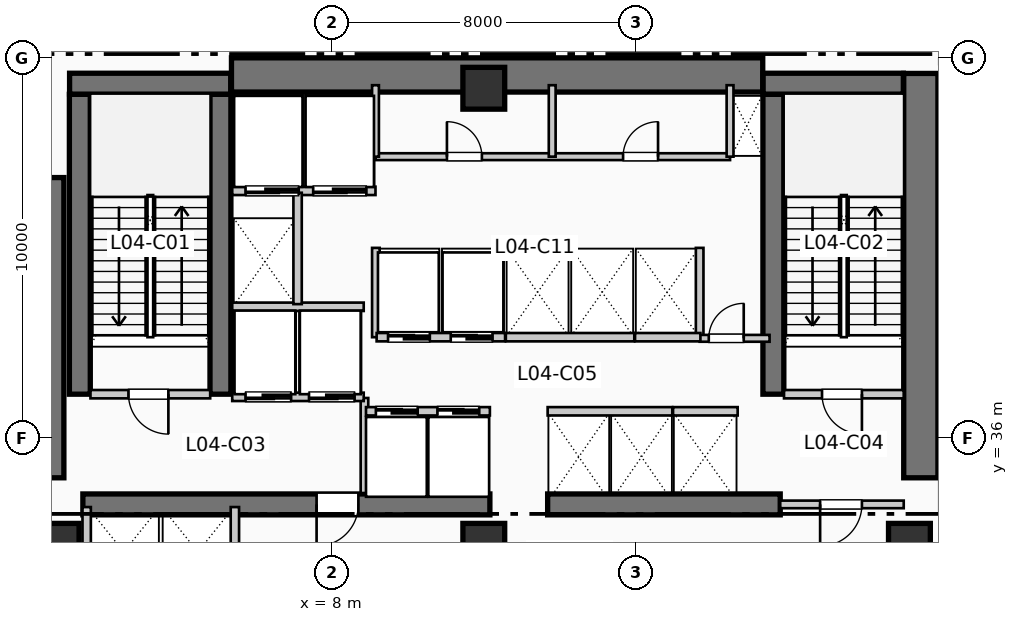
"""IFC4 building model, lengths in metres.
Left out: names, types, materials, properties, quantities, classifications, styles, units other than length and angle.
Written with IfcOpenShell. Run it as: python <this file> out.ifc"""

import sys

from ifc_helpers import new_model, si_unit, direction, frame, frame_2d, origin, origin_2d, place, context, subcontext, project, spatial, rectangle, extrude, element, fill, save


model = new_model("IFC4")
c1 = context("Model", 3, precision=1e-05, world=origin(), true_north=direction((0.0, 1.0)))
c2 = subcontext(c1, "Body", "Model", "MODEL_VIEW")
j1 = project(units=[si_unit("LENGTHUNIT", "METRE"), si_unit("PLANEANGLEUNIT", "RADIAN")], contexts=[c1])
p1 = place(None, origin())
s1 = spatial("IfcSite", under=j1, at=p1, CompositionType="ELEMENT")
p2 = place(p1, origin())
s2 = spatial("IfcBuilding", under=s1, at=p2, CompositionType="ELEMENT")
p3 = place(p2, frame((0.0, 0.0, 21.12)))
s3 = spatial("IfcBuildingStorey", under=s2, at=p3, CompositionType="ELEMENT", Elevation=21.12)
p4 = place(p3, frame((5.36, 45.55, 0.0), z_axis=(0.0, 0.0, 1.0), x_axis=(1.0, 0.0, 0.0)))
e1 = element("IfcWall", 1, at=p4, inside=s3, PredefinedType="SHEAR", context=c2, shape_type="SweptSolid", body=[
    extrude(rectangle(XDim=13.98, YDim=0.9, at=frame_2d((6.99, 0.0))), origin(), (0.0, 0.0, 1.0), 4.62),
])
p5 = place(p3, frame((0.5, 34.95, 0.0), z_axis=(0.0, 0.0, 1.0), x_axis=(0.0, 1.0, 0.0)))
e2 = element("IfcWall", 2, at=p5, inside=s3, PredefinedType="SHEAR", context=c2, shape_type="SweptSolid", body=[
    extrude(rectangle(XDim=7.9, YDim=0.9, at=frame_2d((3.95, 0.0))), origin(), (0.0, 0.0, 1.0), 4.62),
])
p6 = place(p3, frame((23.5, 34.95, 0.0), z_axis=(0.0, 0.0, 1.0), x_axis=(0.0, 1.0, 0.0)))
e3 = element("IfcWall", 3, at=p6, inside=s3, PredefinedType="SHEAR", context=c2, shape_type="SweptSolid", body=[
    extrude(rectangle(XDim=10.64, YDim=0.9, at=frame_2d((5.32, 0.0))), origin(), (0.0, 0.0, 1.0), 4.62),
])
p7 = place(p3, frame((1.45, 34.25, 0.0), z_axis=(0.0, 0.0, 1.0), x_axis=(1.0, 0.0, 0.0)))
e4 = element("IfcWall", 4, at=p7, inside=s3, PredefinedType="SHEAR", context=c2, shape_type="SweptSolid", body=[
    extrude(rectangle(XDim=10.71, YDim=0.55, at=frame_2d((5.355, 0.0))), origin(), (0.0, 0.0, 1.0), 4.62),
])
p8 = place(p7, frame((7.25, 0.0, 0.0), z_axis=(0.0, 0.0, 1.0), x_axis=(-1.0, 0.0, 0.0)))
e5 = element("IfcOpeningElement", 5, at=p8, cuts=e4, PredefinedType="OPENING", context=c2, shape_type="SweptSolid", body=[
    extrude(rectangle(XDim=1.1, YDim=2.15, at=frame_2d((0.55, 1.075))), frame((0.0, 0.285, 0.0), z_axis=(0.0, -1.0, 0.0), x_axis=(1.0, 0.0, 0.0)), (0.0, 0.0, 1.0), 0.57),
])
p9 = place(p3, frame((13.68, 34.25, 0.0), z_axis=(0.0, 0.0, 1.0), x_axis=(1.0, 0.0, 0.0)))
e6 = element("IfcWall", 6, at=p9, inside=s3, PredefinedType="SHEAR", context=c2, shape_type="SweptSolid", body=[
    extrude(rectangle(XDim=6.12, YDim=0.55, at=frame_2d((3.06, 0.0))), origin(), (0.0, 0.0, 1.0), 4.62),
])
for number, where, z_axis, x_axis in (
    (7, (1.37, 37.15, 0.0), (0.0, 0.0, 1.0), (0.0, 1.0, 0.0)),
    (8, (5.07, 37.15, 0.0), (0.0, 0.0, 1.0), (0.0, 1.0, 0.0)),
):
    element("IfcWall", number, at=place(p3, frame(where, z_axis=z_axis, x_axis=x_axis)), inside=s3, PredefinedType="SHEAR", context=c2, shape_type="SweptSolid", body=[
        extrude(rectangle(XDim=7.89, YDim=0.55, at=frame_2d((3.945, 0.0))), origin(), (0.0, 0.0, 1.0), 4.62),
    ])
p10 = place(p3, frame((1.1, 45.32, 0.0), z_axis=(0.0, 0.0, 1.0), x_axis=(1.0, 0.0, 0.0)))
e9 = element("IfcWall", 9, at=p10, inside=s3, PredefinedType="SHEAR", context=c2, shape_type="SweptSolid", body=[
    extrude(rectangle(XDim=4.24, YDim=0.55, at=frame_2d((2.12, 0.0))), origin(), (0.0, 0.0, 1.0), 4.62),
])
p11 = place(p3, frame((19.62, 37.15, 0.0), z_axis=(0.0, 0.0, 1.0), x_axis=(0.0, 1.0, 0.0)))
e10 = element("IfcWall", 10, at=p11, inside=s3, PredefinedType="SHEAR", context=c2, shape_type="SweptSolid", body=[
    extrude(rectangle(XDim=7.89, YDim=0.55, at=frame_2d((3.945, 0.0))), origin(), (0.0, 0.0, 1.0), 4.62),
])
p12 = place(p3, frame((19.35, 45.32, 0.0), z_axis=(0.0, 0.0, 1.0), x_axis=(1.0, 0.0, 0.0)))
e11 = element("IfcWall", 11, at=p12, inside=s3, PredefinedType="SHEAR", context=c2, shape_type="SweptSolid", body=[
    extrude(rectangle(XDim=3.69, YDim=0.55, at=frame_2d((1.845, 0.0))), origin(), (0.0, 0.0, 1.0), 4.62),
])
for number, where, z_axis, x_axis in (
    (12, (0.8, 33.2, 0.0), (0.0, 0.0, 1.0), (1.0, 0.0, 0.0)),
    (13, (12.0, 33.2, 0.0), (0.0, 0.0, 1.0), (1.0, 0.0, 0.0)),
    (14, (12.0, 45.2, 0.0), (0.0, 0.0, 1.0), (1.0, 0.0, 0.0)),
    (15, (23.2, 33.2, 0.0), (0.0, 0.0, 1.0), (1.0, 0.0, 0.0)),
):
    element("IfcColumn", number, at=place(p3, frame(where, z_axis=z_axis, x_axis=x_axis)), inside=s3, PredefinedType="COLUMN", context=c2, shape_type="SweptSolid", body=[
        extrude(rectangle(XDim=1.1, YDim=1.1, at=origin_2d()), origin(), (0.0, 0.0, 1.0), 4.62),
    ])
p13 = place(p3, frame((1.088, 47.834, 0.0), z_axis=(0.0, 0.0, 1.0), x_axis=(-0.707106781187, -0.707106781187, 0.0)))
e16 = element("IfcWall", 16, at=p13, inside=s3, PredefinedType="SOLIDWALL", context=c2, shape_type="SweptSolid", body=[
    extrude(rectangle(XDim=4.133, YDim=0.36, at=frame_2d((2.066, 0.0))), origin(), (0.0, 0.0, 1.0), 4.2),
])
p14 = place(p3, frame((1.65, 37.15, 0.0), z_axis=(0.0, 0.0, 1.0), x_axis=(1.0, 0.0, 0.0)))
e17 = element("IfcWall", 17, at=p14, inside=s3, PredefinedType="PARTITIONING", context=c2, shape_type="SweptSolid", body=[
    extrude(rectangle(XDim=3.15, YDim=0.22, at=frame_2d((1.575, 0.0))), origin(), (0.0, 0.0, 1.0), 4.2),
])
p15 = place(p14, frame((2.05, 0.0, 0.0), z_axis=(0.0, 0.0, 1.0), x_axis=(-1.0, 0.0, 0.0)))
e18 = element("IfcOpeningElement", 18, at=p15, cuts=e17, PredefinedType="OPENING", context=c2, shape_type="SweptSolid", body=[
    extrude(rectangle(XDim=1.05, YDim=2.15, at=frame_2d((0.525, 1.075))), frame((0.0, 0.12, 0.0), z_axis=(0.0, -1.0, 0.0), x_axis=(1.0, 0.0, 0.0)), (0.0, 0.0, 1.0), 0.24),
])
p16 = place(p3, frame((8.86, 34.55, 0.0), z_axis=(0.0, 0.0, 1.0), x_axis=(0.0, 1.0, 0.0)))
e19 = element("IfcWall", 19, at=p16, inside=s3, PredefinedType="PARTITIONING", context=c2, shape_type="SweptSolid", body=[
    extrude(rectangle(XDim=2.5, YDim=0.2, at=frame_2d((1.25, 0.0))), origin(), (0.0, 0.0, 1.0), 4.2),
])
p17 = place(p3, frame((19.9, 37.15, 0.0), z_axis=(0.0, 0.0, 1.0), x_axis=(1.0, 0.0, 0.0)))
e20 = element("IfcWall", 20, at=p17, inside=s3, PredefinedType="PARTITIONING", context=c2, shape_type="SweptSolid", body=[
    extrude(rectangle(XDim=3.15, YDim=0.22, at=frame_2d((1.575, 0.0))), origin(), (0.0, 0.0, 1.0), 4.2),
])
p18 = place(p17, frame((2.05, 0.0, 0.0), z_axis=(0.0, 0.0, 1.0), x_axis=(-1.0, 0.0, 0.0)))
e21 = element("IfcOpeningElement", 21, at=p18, cuts=e20, PredefinedType="OPENING", context=c2, shape_type="SweptSolid", body=[
    extrude(rectangle(XDim=1.05, YDim=2.15, at=frame_2d((0.525, 1.075))), frame((0.0, 0.12, 0.0), z_axis=(0.0, -1.0, 0.0), x_axis=(1.0, 0.0, 0.0)), (0.0, 0.0, 1.0), 0.24),
])
p19 = place(p3, frame((19.8, 34.25, 0.0), z_axis=(0.0, 0.0, 1.0), x_axis=(1.0, 0.0, 0.0)))
e22 = element("IfcWall", 22, at=p19, inside=s3, PredefinedType="PARTITIONING", context=c2, shape_type="SweptSolid", body=[
    extrude(rectangle(XDim=3.25, YDim=0.2, at=frame_2d((1.625, 0.0))), origin(), (0.0, 0.0, 1.0), 4.2),
])
p20 = place(p19, frame((2.15, 0.0, 0.0), z_axis=(0.0, 0.0, 1.0), x_axis=(-1.0, 0.0, 0.0)))
e23 = element("IfcOpeningElement", 23, at=p20, cuts=e22, PredefinedType="OPENING", context=c2, shape_type="SweptSolid", body=[
    extrude(rectangle(XDim=1.1, YDim=2.15, at=frame_2d((0.55, 1.075))), frame((0.0, 0.11, 0.0), z_axis=(0.0, -1.0, 0.0), x_axis=(1.0, 0.0, 0.0)), (0.0, 0.0, 1.0), 0.22),
])
p21 = place(p3, frame((5.38, 37.08, 0.0), z_axis=(0.0, 0.0, 1.0), x_axis=(1.0, 0.0, 0.0)))
e24 = element("IfcWall", 24, at=p21, inside=s3, PredefinedType="PARTITIONING", context=c2, shape_type="SweptSolid", body=[
    extrude(rectangle(XDim=3.46, YDim=0.22, at=frame_2d((1.73, 0.0))), origin(), (0.0, 0.0, 1.0), 4.2),
])
p22 = place(p21, frame((1.55, 0.0, 0.0), z_axis=(0.0, 0.0, 1.0), x_axis=(-1.0, 0.0, 0.0)))
e25 = element("IfcOpeningElement", 25, at=p22, cuts=e24, PredefinedType="OPENING", context=c2, shape_type="SweptSolid", body=[
    extrude(rectangle(XDim=1.2, YDim=2.2, at=frame_2d((0.6, 1.1))), frame((0.0, 0.12, 0.0), z_axis=(0.0, -1.0, 0.0), x_axis=(1.0, 0.0, 0.0)), (0.0, 0.0, 1.0), 0.24),
])
p23 = place(p21, frame((3.22, 0.0, 0.0), z_axis=(0.0, 0.0, 1.0), x_axis=(-1.0, 0.0, 0.0)))
e26 = element("IfcOpeningElement", 26, at=p23, cuts=e24, PredefinedType="OPENING", context=c2, shape_type="SweptSolid", body=[
    extrude(rectangle(XDim=1.2, YDim=2.2, at=frame_2d((0.6, 1.1))), frame((0.0, 0.12, 0.0), z_axis=(0.0, -1.0, 0.0), x_axis=(1.0, 0.0, 0.0)), (0.0, 0.0, 1.0), 0.24),
])
p24 = place(p3, frame((5.38, 39.45, 0.0), z_axis=(0.0, 0.0, 1.0), x_axis=(1.0, 0.0, 0.0)))
e27 = element("IfcWall", 27, at=p24, inside=s3, PredefinedType="PARTITIONING", context=c2, shape_type="SweptSolid", body=[
    extrude(rectangle(XDim=3.46, YDim=0.22, at=frame_2d((1.73, 0.0))), origin(), (0.0, 0.0, 1.0), 4.2),
])
p25 = place(p3, frame((5.38, 42.5, 0.0), z_axis=(0.0, 0.0, 1.0), x_axis=(1.0, 0.0, 0.0)))
e28 = element("IfcWall", 28, at=p25, inside=s3, PredefinedType="PARTITIONING", context=c2, shape_type="SweptSolid", body=[
    extrude(rectangle(XDim=3.77, YDim=0.22, at=frame_2d((1.885, 0.0))), origin(), (0.0, 0.0, 1.0), 4.2),
])
p26 = place(p25, frame((1.75, 0.0, 0.0), z_axis=(0.0, 0.0, 1.0), x_axis=(-1.0, 0.0, 0.0)))
e29 = element("IfcOpeningElement", 29, at=p26, cuts=e28, PredefinedType="OPENING", context=c2, shape_type="SweptSolid", body=[
    extrude(rectangle(XDim=1.4, YDim=2.2, at=frame_2d((0.7, 1.1))), frame((0.0, 0.12, 0.0), z_axis=(0.0, -1.0, 0.0), x_axis=(1.0, 0.0, 0.0)), (0.0, 0.0, 1.0), 0.24),
])
p27 = place(p25, frame((3.53, 0.0, 0.0), z_axis=(0.0, 0.0, 1.0), x_axis=(-1.0, 0.0, 0.0)))
e30 = element("IfcOpeningElement", 30, at=p27, cuts=e28, PredefinedType="OPENING", context=c2, shape_type="SweptSolid", body=[
    extrude(rectangle(XDim=1.4, YDim=2.2, at=frame_2d((0.7, 1.1))), frame((0.0, 0.12, 0.0), z_axis=(0.0, -1.0, 0.0), x_axis=(1.0, 0.0, 0.0)), (0.0, 0.0, 1.0), 0.24),
])
p28 = place(p3, frame((7.1, 39.52, 0.0), z_axis=(0.0, 0.0, 1.0), x_axis=(0.0, 1.0, 0.0)))
e31 = element("IfcWall", 31, at=p28, inside=s3, PredefinedType="PARTITIONING", context=c2, shape_type="SweptSolid", body=[
    extrude(rectangle(XDim=2.93, YDim=0.22, at=frame_2d((1.465, 0.0))), origin(), (0.0, 0.0, 1.0), 4.2),
])
for number, where, z_axis, x_axis in (
    (32, (1.55, 31.8, 0.0), (0.0, 0.0, 1.0), (0.0, 1.0, 0.0)),
    (33, (5.45, 31.8, 0.0), (0.0, 0.0, 1.0), (0.0, 1.0, 0.0)),
):
    element("IfcWall", number, at=place(p3, frame(where, z_axis=z_axis, x_axis=x_axis)), inside=s3, PredefinedType="PARTITIONING", context=c2, shape_type="SweptSolid", body=[
        extrude(rectangle(XDim=2.38, YDim=0.22, at=frame_2d((1.19, 0.0))), origin(), (0.0, 0.0, 1.0), 4.2),
    ])
for number, where, z_axis, x_axis in (
    (34, (9.16, 38.65, 0.0), (0.0, 0.0, 1.0), (0.0, 1.0, 0.0)),
    (35, (17.68, 38.65, 0.0), (0.0, 0.0, 1.0), (0.0, 1.0, 0.0)),
):
    element("IfcWall", number, at=place(p3, frame(where, z_axis=z_axis, x_axis=x_axis)), inside=s3, PredefinedType="PARTITIONING", context=c2, shape_type="SweptSolid", body=[
        extrude(rectangle(XDim=2.35, YDim=0.2, at=frame_2d((1.175, 0.0))), origin(), (0.0, 0.0, 1.0), 4.2),
    ])
p29 = place(p3, frame((17.68, 38.62, 0.0), z_axis=(0.0, 0.0, 1.0), x_axis=(1.0, 0.0, 0.0)))
e36 = element("IfcWall", 36, at=p29, inside=s3, PredefinedType="PARTITIONING", context=c2, shape_type="SweptSolid", body=[
    extrude(rectangle(XDim=1.84, YDim=0.18, at=frame_2d((0.92, 0.0))), origin(), (0.0, 0.0, 1.0), 4.2),
])
p30 = place(p29, frame((0.24, 0.0, 0.0)))
e37 = element("IfcOpeningElement", 37, at=p30, cuts=e36, PredefinedType="OPENING", context=c2, shape_type="SweptSolid", body=[
    extrude(rectangle(XDim=0.92, YDim=2.1, at=frame_2d((0.46, 1.05))), frame((0.0, 0.1, 0.0), z_axis=(0.0, -1.0, 0.0), x_axis=(1.0, 0.0, 0.0)), (0.0, 0.0, 1.0), 0.2),
])
p31 = place(p3, frame((8.9, 36.7, 0.0), z_axis=(0.0, 0.0, 1.0), x_axis=(1.0, 0.0, 0.0)))
e38 = element("IfcWall", 38, at=p31, inside=s3, PredefinedType="PARTITIONING", context=c2, shape_type="SweptSolid", body=[
    extrude(rectangle(XDim=3.26, YDim=0.22, at=frame_2d((1.63, 0.0))), origin(), (0.0, 0.0, 1.0), 4.2),
])
p32 = place(p31, frame((0.26, 0.0, 0.0)))
e39 = element("IfcOpeningElement", 39, at=p32, cuts=e38, PredefinedType="OPENING", context=c2, shape_type="SweptSolid", body=[
    extrude(rectangle(XDim=1.1, YDim=2.2, at=frame_2d((0.55, 1.1))), frame((0.0, 0.12, 0.0), z_axis=(0.0, -1.0, 0.0), x_axis=(1.0, 0.0, 0.0)), (0.0, 0.0, 1.0), 0.24),
])
p33 = place(p31, frame((1.88, 0.0, 0.0)))
e40 = element("IfcOpeningElement", 40, at=p33, cuts=e38, PredefinedType="OPENING", context=c2, shape_type="SweptSolid", body=[
    extrude(rectangle(XDim=1.1, YDim=2.2, at=frame_2d((0.55, 1.1))), frame((0.0, 0.12, 0.0), z_axis=(0.0, -1.0, 0.0), x_axis=(1.0, 0.0, 0.0)), (0.0, 0.0, 1.0), 0.24),
])
p34 = place(p3, frame((9.18, 38.65, 0.0), z_axis=(0.0, 0.0, 1.0), x_axis=(1.0, 0.0, 0.0)))
e41 = element("IfcWall", 41, at=p34, inside=s3, PredefinedType="PARTITIONING", context=c2, shape_type="SweptSolid", body=[
    extrude(rectangle(XDim=3.38, YDim=0.22, at=frame_2d((1.69, 0.0))), origin(), (0.0, 0.0, 1.0), 4.2),
])
p35 = place(p34, frame((0.3, 0.0, 0.0)))
e42 = element("IfcOpeningElement", 42, at=p35, cuts=e41, PredefinedType="OPENING", context=c2, shape_type="SweptSolid", body=[
    extrude(rectangle(XDim=1.1, YDim=2.2, at=frame_2d((0.55, 1.1))), frame((0.0, 0.12, 0.0), z_axis=(0.0, -1.0, 0.0), x_axis=(1.0, 0.0, 0.0)), (0.0, 0.0, 1.0), 0.24),
])
p36 = place(p34, frame((1.95, 0.0, 0.0)))
e43 = element("IfcOpeningElement", 43, at=p36, cuts=e41, PredefinedType="OPENING", context=c2, shape_type="SweptSolid", body=[
    extrude(rectangle(XDim=1.1, YDim=2.2, at=frame_2d((0.55, 1.1))), frame((0.0, 0.12, 0.0), z_axis=(0.0, -1.0, 0.0), x_axis=(1.0, 0.0, 0.0)), (0.0, 0.0, 1.0), 0.24),
])
p37 = place(p3, frame((13.68, 36.7, 0.0), z_axis=(0.0, 0.0, 1.0), x_axis=(1.0, 0.0, 0.0)))
e44 = element("IfcWall", 44, at=p37, inside=s3, PredefinedType="PARTITIONING", context=c2, shape_type="SweptSolid", body=[
    extrude(rectangle(XDim=3.28, YDim=0.22, at=frame_2d((1.64, 0.0))), origin(), (0.0, 0.0, 1.0), 4.2),
])
p38 = place(p3, frame((12.58, 38.65, 0.0), z_axis=(0.0, 0.0, 1.0), x_axis=(1.0, 0.0, 0.0)))
e45 = element("IfcWall", 45, at=p38, inside=s3, PredefinedType="PARTITIONING", context=c2, shape_type="SweptSolid", body=[
    extrude(rectangle(XDim=3.38, YDim=0.22, at=frame_2d((1.69, 0.0))), origin(), (0.0, 0.0, 1.0), 4.2),
])
p39 = place(p3, frame((16.98, 36.7, 0.0), z_axis=(0.0, 0.0, 1.0), x_axis=(1.0, 0.0, 0.0)))
e46 = element("IfcWall", 46, at=p39, inside=s3, PredefinedType="PARTITIONING", context=c2, shape_type="SweptSolid", body=[
    extrude(rectangle(XDim=1.7, YDim=0.22, at=frame_2d((0.85, 0.0))), origin(), (0.0, 0.0, 1.0), 4.2),
])
p40 = place(p3, frame((15.98, 38.65, 0.0), z_axis=(0.0, 0.0, 1.0), x_axis=(1.0, 0.0, 0.0)))
e47 = element("IfcWall", 47, at=p40, inside=s3, PredefinedType="PARTITIONING", context=c2, shape_type="SweptSolid", body=[
    extrude(rectangle(XDim=1.72, YDim=0.22, at=frame_2d((0.86, 0.0))), origin(), (0.0, 0.0, 1.0), 4.2),
])
p41 = place(p3, frame((9.15, 43.4, 0.0), z_axis=(0.0, 0.0, 1.0), x_axis=(1.0, 0.0, 0.0)))
e48 = element("IfcWall", 48, at=p41, inside=s3, PredefinedType="PLUMBINGWALL", context=c2, shape_type="SweptSolid", body=[
    extrude(rectangle(XDim=9.33, YDim=0.18, at=frame_2d((4.665, 0.0))), origin(), (0.0, 0.0, 1.0), 4.2),
])
p42 = place(p41, frame((1.88, 0.0, 0.0)))
e49 = element("IfcOpeningElement", 49, at=p42, cuts=e48, PredefinedType="OPENING", context=c2, shape_type="SweptSolid", body=[
    extrude(rectangle(XDim=0.92, YDim=2.1, at=frame_2d((0.46, 1.05))), frame((0.0, 0.1, 0.0), z_axis=(0.0, -1.0, 0.0), x_axis=(1.0, 0.0, 0.0)), (0.0, 0.0, 1.0), 0.2),
])
p43 = place(p41, frame((6.515, 0.0, 0.0)))
e50 = element("IfcOpeningElement", 50, at=p43, cuts=e48, PredefinedType="OPENING", context=c2, shape_type="SweptSolid", body=[
    extrude(rectangle(XDim=0.92, YDim=2.1, at=frame_2d((0.46, 1.05))), frame((0.0, 0.1, 0.0), z_axis=(0.0, -1.0, 0.0), x_axis=(1.0, 0.0, 0.0)), (0.0, 0.0, 1.0), 0.2),
])
for number, where, z_axis, x_axis in (
    (51, (9.15, 43.4, 0.0), (0.0, 0.0, 1.0), (0.0, 1.0, 0.0)),
    (52, (18.48, 43.4, 0.0), (0.0, 0.0, 1.0), (0.0, 1.0, 0.0)),
    (53, (13.8, 43.4, 0.0), (0.0, 0.0, 1.0), (0.0, 1.0, 0.0)),
):
    element("IfcWall", number, at=place(p3, frame(where, z_axis=z_axis, x_axis=x_axis)), inside=s3, PredefinedType="PLUMBINGWALL", context=c2, shape_type="SweptSolid", body=[
        extrude(rectangle(XDim=1.88, YDim=0.18, at=frame_2d((0.94, 0.0))), origin(), (0.0, 0.0, 1.0), 4.2),
    ])
p44 = place(p15, origin())
e54 = element("IfcDoor", 54, at=p44, inside=s3, OperationType="SINGLE_SWING_RIGHT", PredefinedType="DOOR", context=c2, shape_type="SweptSolid", body=[
    extrude(rectangle(XDim=1.05, YDim=2.15, at=frame_2d((0.525, 1.075))), frame((0.0, 0.025, 0.0), z_axis=(0.0, -1.0, 0.0), x_axis=(1.0, 0.0, 0.0)), (0.0, 0.0, 1.0), 0.05),
])
fill(e18, e54)
p45 = place(p8, origin())
e55 = element("IfcDoor", 55, at=p45, inside=s3, OperationType="SINGLE_SWING_LEFT", PredefinedType="DOOR", context=c2, shape_type="SweptSolid", body=[
    extrude(rectangle(XDim=1.1, YDim=2.15, at=frame_2d((0.55, 1.075))), frame((0.0, 0.025, 0.0), z_axis=(0.0, -1.0, 0.0), x_axis=(1.0, 0.0, 0.0)), (0.0, 0.0, 1.0), 0.05),
])
fill(e5, e55)
p46 = place(p18, origin())
e56 = element("IfcDoor", 56, at=p46, inside=s3, OperationType="SINGLE_SWING_RIGHT", PredefinedType="DOOR", context=c2, shape_type="SweptSolid", body=[
    extrude(rectangle(XDim=1.05, YDim=2.15, at=frame_2d((0.525, 1.075))), frame((0.0, 0.025, 0.0), z_axis=(0.0, -1.0, 0.0), x_axis=(1.0, 0.0, 0.0)), (0.0, 0.0, 1.0), 0.05),
])
fill(e21, e56)
p47 = place(p20, origin())
e57 = element("IfcDoor", 57, at=p47, inside=s3, OperationType="SINGLE_SWING_LEFT", PredefinedType="DOOR", context=c2, shape_type="SweptSolid", body=[
    extrude(rectangle(XDim=1.1, YDim=2.15, at=frame_2d((0.55, 1.075))), frame((0.0, 0.025, 0.0), z_axis=(0.0, -1.0, 0.0), x_axis=(1.0, 0.0, 0.0)), (0.0, 0.0, 1.0), 0.05),
])
fill(e23, e57)
p48 = place(p22, origin())
e58 = element("IfcDoor", 58, at=p48, inside=s3, OperationType="SLIDING_TO_RIGHT", PredefinedType="DOOR", context=c2, shape_type="SweptSolid", body=[
    extrude(rectangle(XDim=1.2, YDim=2.2, at=frame_2d((0.6, 1.1))), frame((0.0, 0.025, 0.0), z_axis=(0.0, -1.0, 0.0), x_axis=(1.0, 0.0, 0.0)), (0.0, 0.0, 1.0), 0.05),
])
fill(e25, e58)
p49 = place(p23, origin())
e59 = element("IfcDoor", 59, at=p49, inside=s3, OperationType="SLIDING_TO_RIGHT", PredefinedType="DOOR", context=c2, shape_type="SweptSolid", body=[
    extrude(rectangle(XDim=1.2, YDim=2.2, at=frame_2d((0.6, 1.1))), frame((0.0, 0.025, 0.0), z_axis=(0.0, -1.0, 0.0), x_axis=(1.0, 0.0, 0.0)), (0.0, 0.0, 1.0), 0.05),
])
fill(e26, e59)
p50 = place(p26, origin())
e60 = element("IfcDoor", 60, at=p50, inside=s3, OperationType="SLIDING_TO_LEFT", PredefinedType="DOOR", context=c2, shape_type="SweptSolid", body=[
    extrude(rectangle(XDim=1.4, YDim=2.2, at=frame_2d((0.7, 1.1))), frame((0.0, 0.025, 0.0), z_axis=(0.0, -1.0, 0.0), x_axis=(1.0, 0.0, 0.0)), (0.0, 0.0, 1.0), 0.05),
])
fill(e29, e60)
p51 = place(p27, origin())
e61 = element("IfcDoor", 61, at=p51, inside=s3, OperationType="SLIDING_TO_LEFT", PredefinedType="DOOR", context=c2, shape_type="SweptSolid", body=[
    extrude(rectangle(XDim=1.4, YDim=2.2, at=frame_2d((0.7, 1.1))), frame((0.0, 0.025, 0.0), z_axis=(0.0, -1.0, 0.0), x_axis=(1.0, 0.0, 0.0)), (0.0, 0.0, 1.0), 0.05),
])
fill(e30, e61)
p52 = place(p30, origin())
e62 = element("IfcDoor", 62, at=p52, inside=s3, OperationType="SINGLE_SWING_RIGHT", PredefinedType="DOOR", context=c2, shape_type="SweptSolid", body=[
    extrude(rectangle(XDim=0.92, YDim=2.1, at=frame_2d((0.46, 1.05))), frame((0.0, 0.025, 0.0), z_axis=(0.0, -1.0, 0.0), x_axis=(1.0, 0.0, 0.0)), (0.0, 0.0, 1.0), 0.05),
])
fill(e37, e62)
p53 = place(p32, origin())
e63 = element("IfcDoor", 63, at=p53, inside=s3, OperationType="SLIDING_TO_LEFT", PredefinedType="DOOR", context=c2, shape_type="SweptSolid", body=[
    extrude(rectangle(XDim=1.1, YDim=2.2, at=frame_2d((0.55, 1.1))), frame((0.0, 0.025, 0.0), z_axis=(0.0, -1.0, 0.0), x_axis=(1.0, 0.0, 0.0)), (0.0, 0.0, 1.0), 0.05),
])
fill(e39, e63)
p54 = place(p33, origin())
e64 = element("IfcDoor", 64, at=p54, inside=s3, OperationType="SLIDING_TO_LEFT", PredefinedType="DOOR", context=c2, shape_type="SweptSolid", body=[
    extrude(rectangle(XDim=1.1, YDim=2.2, at=frame_2d((0.55, 1.1))), frame((0.0, 0.025, 0.0), z_axis=(0.0, -1.0, 0.0), x_axis=(1.0, 0.0, 0.0)), (0.0, 0.0, 1.0), 0.05),
])
fill(e40, e64)
p55 = place(p35, origin())
e65 = element("IfcDoor", 65, at=p55, inside=s3, OperationType="SLIDING_TO_LEFT", PredefinedType="DOOR", context=c2, shape_type="SweptSolid", body=[
    extrude(rectangle(XDim=1.1, YDim=2.2, at=frame_2d((0.55, 1.1))), frame((0.0, 0.025, 0.0), z_axis=(0.0, -1.0, 0.0), x_axis=(1.0, 0.0, 0.0)), (0.0, 0.0, 1.0), 0.05),
])
fill(e42, e65)
p56 = place(p36, origin())
e66 = element("IfcDoor", 66, at=p56, inside=s3, OperationType="SLIDING_TO_LEFT", PredefinedType="DOOR", context=c2, shape_type="SweptSolid", body=[
    extrude(rectangle(XDim=1.1, YDim=2.2, at=frame_2d((0.55, 1.1))), frame((0.0, 0.025, 0.0), z_axis=(0.0, -1.0, 0.0), x_axis=(1.0, 0.0, 0.0)), (0.0, 0.0, 1.0), 0.05),
])
fill(e43, e66)
p57 = place(p42, origin())
e67 = element("IfcDoor", 67, at=p57, inside=s3, OperationType="SINGLE_SWING_LEFT", PredefinedType="DOOR", context=c2, shape_type="SweptSolid", body=[
    extrude(rectangle(XDim=0.92, YDim=2.1, at=frame_2d((0.46, 1.05))), frame((0.0, 0.025, 0.0), z_axis=(0.0, -1.0, 0.0), x_axis=(1.0, 0.0, 0.0)), (0.0, 0.0, 1.0), 0.05),
])
fill(e49, e67)
p58 = place(p43, origin())
e68 = element("IfcDoor", 68, at=p58, inside=s3, OperationType="SINGLE_SWING_RIGHT", PredefinedType="DOOR", context=c2, shape_type="SweptSolid", body=[
    extrude(rectangle(XDim=0.92, YDim=2.1, at=frame_2d((0.46, 1.05))), frame((0.0, 0.025, 0.0), z_axis=(0.0, -1.0, 0.0), x_axis=(1.0, 0.0, 0.0)), (0.0, 0.0, 1.0), 0.05),
])
fill(e50, e68)
save(model, sys.argv[1])
